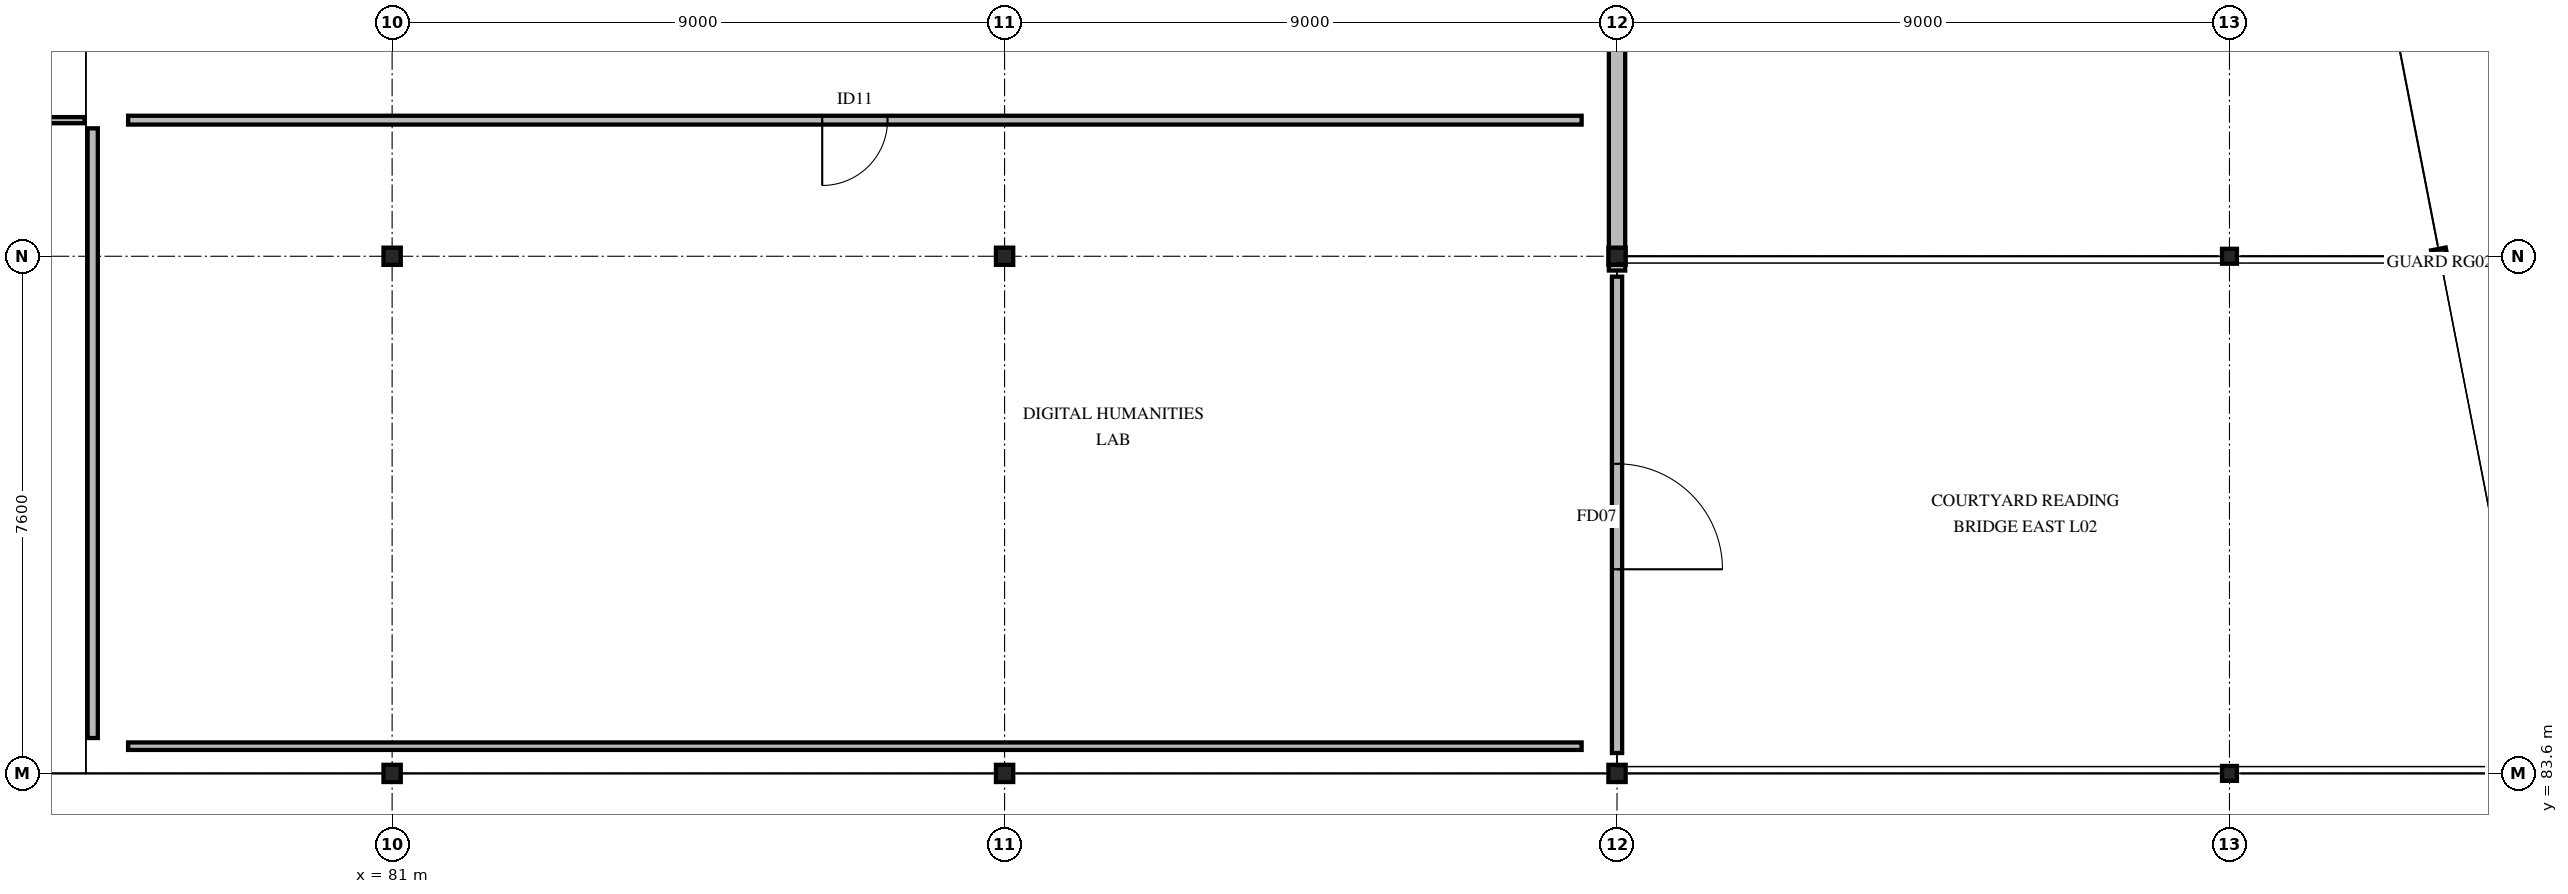
"""IFC4 building model, lengths in metres.
Left out: names, types, materials, properties, quantities, classifications, styles, units other than length and angle.
Written with IfcOpenShell. Run it as: python <this file> out.ifc"""

import sys

from ifc_helpers import new_model, si_unit, direction, frame, frame_2d, origin, origin_2d, place, context, subcontext, project, spatial, rectangle, hollow_circle, i_section, extrude, element, fill, save


model = new_model("IFC4")
c1 = context("Model", 3, precision=1e-05, world=origin(), true_north=direction((0.0, 1.0)))
c2 = subcontext(c1, "Body", "Model", "MODEL_VIEW")
j1 = project(units=[si_unit("LENGTHUNIT", "METRE"), si_unit("PLANEANGLEUNIT", "RADIAN")], contexts=[c1])
p1 = place(None, origin())
s1 = spatial("IfcSite", under=j1, at=p1, CompositionType="ELEMENT")
p2 = place(p1, origin())
s2 = spatial("IfcBuilding", under=s1, at=p2, CompositionType="ELEMENT")
p3 = place(p2, frame((0.0, 0.0, 9.36)))
s3 = spatial("IfcBuildingStorey", under=s2, at=p3, CompositionType="ELEMENT", Elevation=9.36)
for number, where, z_axis, x_axis in (
    (1, (81.0, 83.6, 0.0), (0.0, 0.0, 1.0), (1.0, 0.0, 0.0)),
    (2, (81.0, 91.2, 0.0), (0.0, 0.0, 1.0), (1.0, 0.0, 0.0)),
    (3, (90.0, 83.6, 0.0), (0.0, 0.0, 1.0), (1.0, 0.0, 0.0)),
    (4, (90.0, 91.2, 0.0), (0.0, 0.0, 1.0), (1.0, 0.0, 0.0)),
    (5, (99.0, 83.6, 0.0), (0.0, 0.0, 1.0), (1.0, 0.0, 0.0)),
    (6, (99.0, 91.2, 0.0), (0.0, 0.0, 1.0), (1.0, 0.0, 0.0)),
):
    element("IfcColumn", number, at=place(p3, frame(where, z_axis=z_axis, x_axis=x_axis)), inside=s3, PredefinedType="COLUMN", context=c2, shape_type="SweptSolid", body=[
        extrude(i_section(OverallWidth=0.254, OverallDepth=0.253, WebThickness=0.009, FlangeThickness=0.014, FilletRadius=0.012, at=origin_2d()), origin(), (0.0, 0.0, 1.0), 4.32),
    ])
for number, where, z_axis, x_axis in (
    (7, (108.0, 83.6, 0.0), (0.0, 0.0, 1.0), (1.0, 0.0, 0.0)),
    (8, (108.0, 91.2, 0.0), (0.0, 0.0, 1.0), (1.0, 0.0, 0.0)),
    (9, (111.091, 91.2, 0.0), (0.0, 0.0, 1.0), (0.982, 0.191, 0.0)),
):
    element("IfcColumn", number, at=place(p3, frame(where, z_axis=z_axis, x_axis=x_axis)), inside=s3, PredefinedType="COLUMN", context=c2, shape_type="SweptSolid", body=[
        extrude(hollow_circle(Radius=0.11, WallThickness=0.01, at=origin_2d()), origin(), (0.0, 0.0, 1.0), 4.32),
    ])
p4 = place(p3, frame((99.0, 90.99, 0.0), z_axis=(0.0, 0.0, 1.0), x_axis=(0.0, 1.0, 0.0)))
e10 = element("IfcWall", 10, at=p4, inside=s3, PredefinedType="STANDARD", context=c2, shape_type="SweptSolid", body=[
    extrude(rectangle(XDim=7.81, YDim=0.24, at=frame_2d((3.905, 0.0))), origin(), (0.0, 0.0, 1.0), 3.701),
])
p5 = place(p4, frame((3.26, 0.0, 0.85)))
e11 = element("IfcOpeningElement", 11, at=p5, cuts=e10, PredefinedType="OPENING", context=c2, shape_type="SweptSolid", body=[
    extrude(rectangle(XDim=1.5, YDim=1.2, at=frame_2d((0.75, 0.6))), frame((0.0, 0.13, 0.0), z_axis=(0.0, -1.0, 0.0), x_axis=(1.0, 0.0, 0.0)), (0.0, 0.0, 1.0), 0.26),
])
p6 = place(p3, frame((99.0, 83.9, 0.0), z_axis=(0.0, 0.0, 1.0), x_axis=(0.0, 1.0, 0.0)))
e12 = element("IfcWall", 12, at=p6, inside=s3, PredefinedType="PARTITIONING", context=c2, shape_type="SweptSolid", body=[
    extrude(rectangle(XDim=7.0, YDim=0.15, at=frame_2d((3.5, 0.0))), origin(), (0.0, 0.0, 1.0), 3.701),
])
p7 = place(p6, frame((2.7, 0.0, 0.0)))
e13 = element("IfcOpeningElement", 13, at=p7, cuts=e12, PredefinedType="OPENING", context=c2, shape_type="SweptSolid", body=[
    extrude(rectangle(XDim=1.55, YDim=2.2, at=frame_2d((0.775, 1.1))), frame((0.0, 0.085, 0.0), z_axis=(0.0, -1.0, 0.0), x_axis=(1.0, 0.0, 0.0)), (0.0, 0.0, 1.0), 0.17),
])
p8 = place(p3, frame((54.52, 93.2, 0.0), z_axis=(0.0, 0.0, 1.0), x_axis=(1.0, 0.0, 0.0)))
e14 = element("IfcWall", 14, at=p8, inside=s3, PredefinedType="PARTITIONING", context=c2, shape_type="SweptSolid", body=[
    extrude(rectangle(XDim=21.96, YDim=0.09, at=frame_2d((10.98, 0.0))), origin(), (0.0, 0.0, 1.0), 4.04),
])
p9 = place(p8, frame((10.415, 0.0, 0.0)))
e15 = element("IfcOpeningElement", 15, at=p9, cuts=e14, PredefinedType="OPENING", context=c2, shape_type="SweptSolid", body=[
    extrude(rectangle(XDim=1.13, YDim=2.15, at=frame_2d((0.565, 1.075))), frame((0.0, 0.055, 0.0), z_axis=(0.0, -1.0, 0.0), x_axis=(1.0, 0.0, 0.0)), (0.0, 0.0, 1.0), 0.11),
])
p10 = place(p3, frame((76.6, 84.12, 0.0), z_axis=(0.0, 0.0, 1.0), x_axis=(0.0, 1.0, 0.0)))
e16 = element("IfcWall", 16, at=p10, inside=s3, PredefinedType="PARTITIONING", context=c2, shape_type="SweptSolid", body=[
    extrude(rectangle(XDim=8.96, YDim=0.15, at=frame_2d((4.48, 0.0))), origin(), (0.0, 0.0, 1.0), 4.04),
])
p11 = place(p3, frame((77.12, 93.2, 0.0), z_axis=(0.0, 0.0, 1.0), x_axis=(1.0, 0.0, 0.0)))
e17 = element("IfcWall", 17, at=p11, inside=s3, PredefinedType="PARTITIONING", context=c2, shape_type="SweptSolid", body=[
    extrude(rectangle(XDim=21.36, YDim=0.13, at=frame_2d((10.68, 0.0))), origin(), (0.0, 0.0, 1.0), 4.04),
])
p12 = place(p11, frame((10.2, 0.0, 0.0)))
e18 = element("IfcOpeningElement", 18, at=p12, cuts=e17, PredefinedType="OPENING", context=c2, shape_type="SweptSolid", body=[
    extrude(rectangle(XDim=0.96, YDim=2.1, at=frame_2d((0.48, 1.05))), frame((0.0, 0.075, 0.0), z_axis=(0.0, -1.0, 0.0), x_axis=(1.0, 0.0, 0.0)), (0.0, 0.0, 1.0), 0.15),
])
p13 = place(p3, frame((77.12, 84.0, 0.0), z_axis=(0.0, 0.0, 1.0), x_axis=(1.0, 0.0, 0.0)))
e19 = element("IfcWall", 19, at=p13, inside=s3, PredefinedType="PARTITIONING", context=c2, shape_type="SweptSolid", body=[
    extrude(rectangle(XDim=21.36, YDim=0.11, at=frame_2d((10.68, 0.0))), origin(), (0.0, 0.0, 1.0), 4.04),
])
p14 = place(p7, origin())
e20 = element("IfcDoor", 20, at=p14, inside=s3, OperationType="SINGLE_SWING_RIGHT", PredefinedType="DOOR", context=c2, shape_type="SweptSolid", body=[
    extrude(rectangle(XDim=1.55, YDim=2.2, at=frame_2d((0.775, 1.1))), frame((0.0, 0.025, 0.0), z_axis=(0.0, -1.0, 0.0), x_axis=(1.0, 0.0, 0.0)), (0.0, 0.0, 1.0), 0.05),
])
fill(e13, e20)
p15 = place(p12, origin())
e21 = element("IfcDoor", 21, at=p15, inside=s3, OperationType="SINGLE_SWING_RIGHT", PredefinedType="DOOR", context=c2, shape_type="SweptSolid", body=[
    extrude(rectangle(XDim=0.96, YDim=2.1, at=frame_2d((0.48, 1.05))), frame((0.0, 0.025, 0.0), z_axis=(0.0, -1.0, 0.0), x_axis=(1.0, 0.0, 0.0)), (0.0, 0.0, 1.0), 0.05),
])
fill(e18, e21)
save(model, sys.argv[1])
